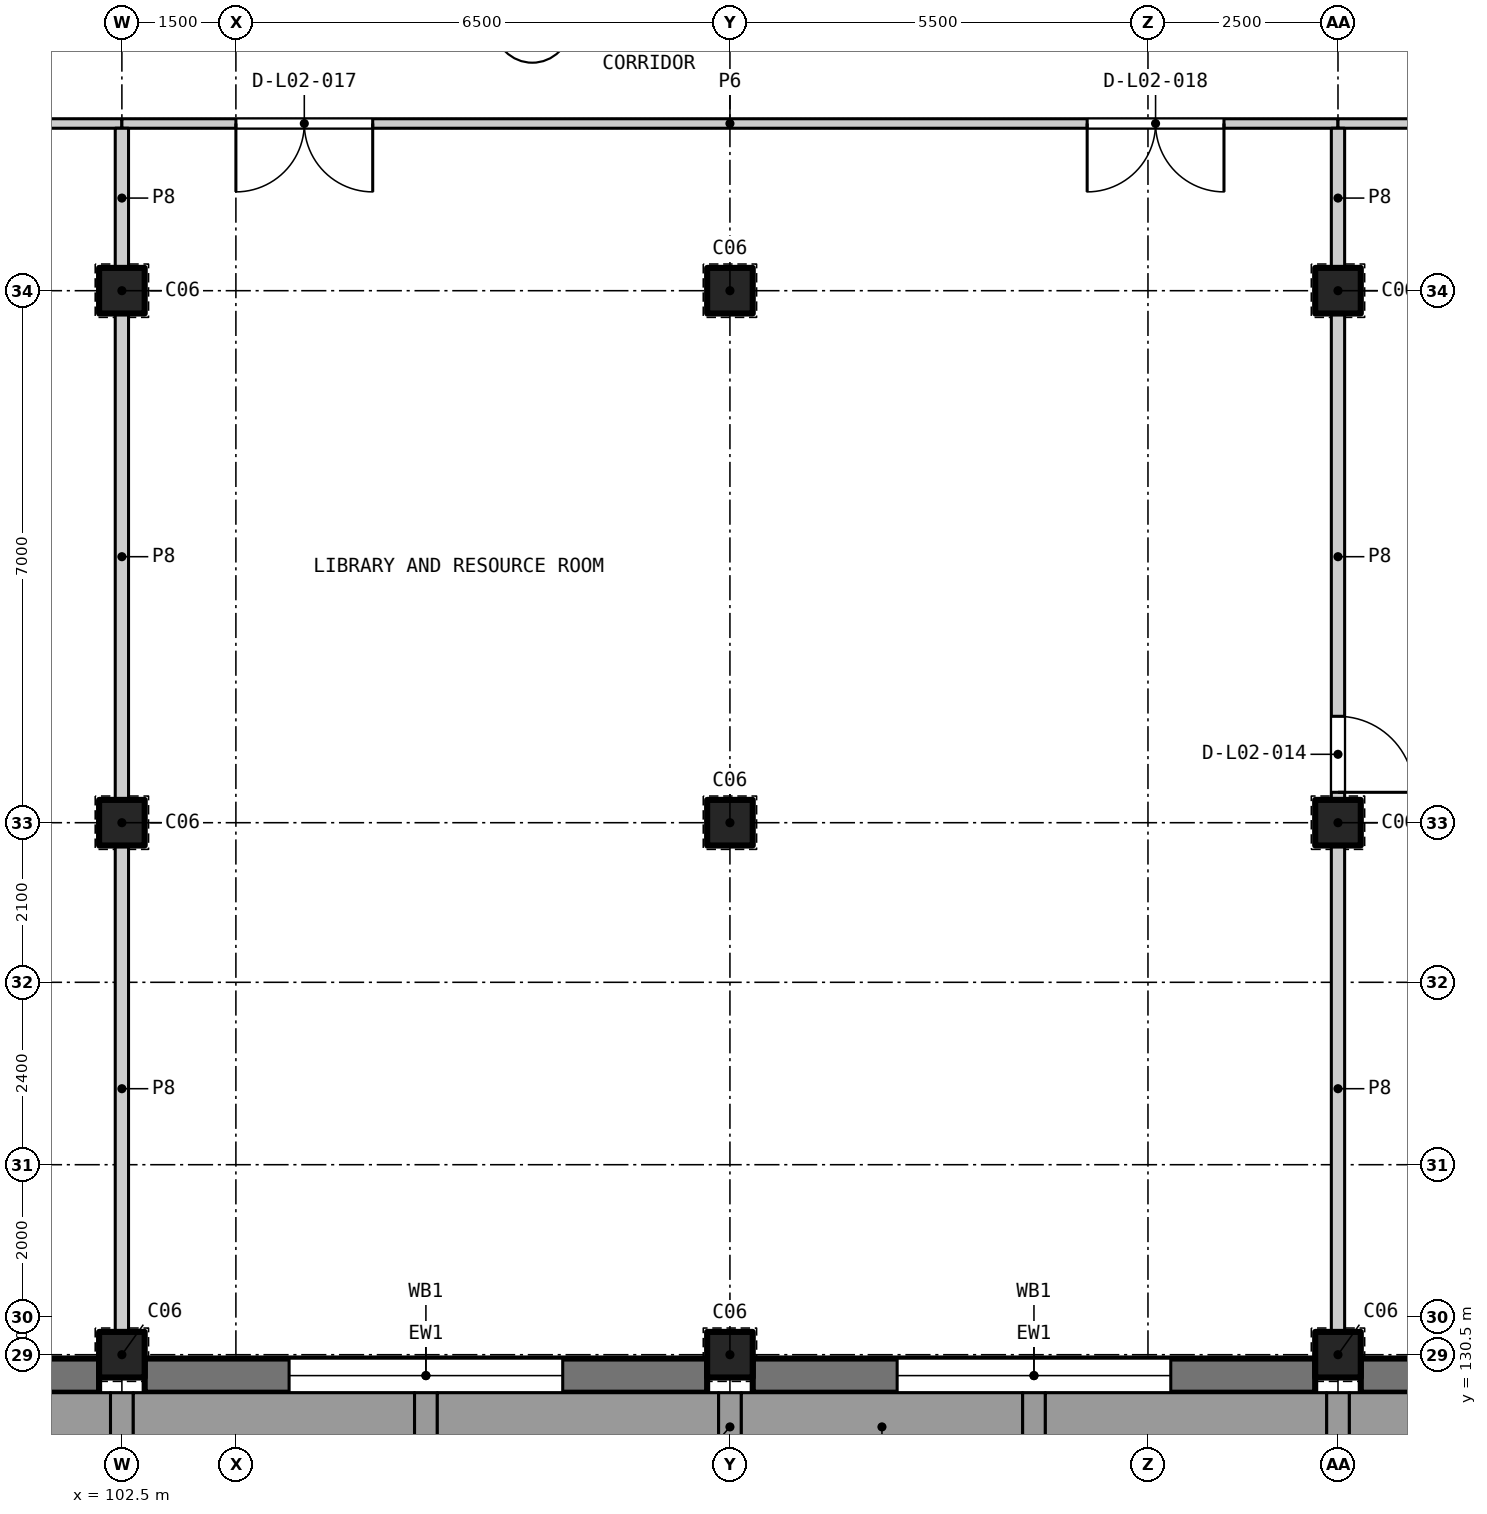
"""IFC4 building model, lengths in metres.
Left out: names, types, materials, properties, quantities, classifications, styles, units other than length and angle.
Written with IfcOpenShell. Run it as: python <this file> out.ifc"""

import sys

from ifc_helpers import new_model, si_unit, direction, frame, frame_2d, origin, origin_2d, place, context, subcontext, project, spatial, rectangle, extrude, element, fill, save


model = new_model("IFC4")
c1 = context("Model", 3, precision=1e-05, world=origin(), true_north=direction((0.0, 1.0)))
c2 = subcontext(c1, "Body", "Model", "MODEL_VIEW")
j1 = project(units=[si_unit("LENGTHUNIT", "METRE"), si_unit("PLANEANGLEUNIT", "RADIAN")], contexts=[c1])
p1 = place(None, origin())
s1 = spatial("IfcSite", under=j1, at=p1, CompositionType="ELEMENT")
p2 = place(p1, origin())
s2 = spatial("IfcBuilding", under=s1, at=p2, CompositionType="ELEMENT")
p3 = place(p2, frame((0.0, 0.0, 10.2)))
s3 = spatial("IfcBuildingStorey", under=s2, at=p3, CompositionType="ELEMENT", Elevation=10.2)
for number, where, z_axis, x_axis in (
    (1, (102.5, 130.5, 0.0), (0.0, 0.0, 1.0), (1.0, 0.0, 0.0)),
    (2, (102.5, 137.5, 0.0), (0.0, 0.0, 1.0), (1.0, 0.0, 0.0)),
    (3, (102.5, 144.5, 0.0), (0.0, 0.0, 1.0), (1.0, 0.0, 0.0)),
    (4, (110.5, 130.5, 0.0), (0.0, 0.0, 1.0), (1.0, 0.0, 0.0)),
    (5, (110.5, 137.5, 0.0), (0.0, 0.0, 1.0), (1.0, 0.0, 0.0)),
    (6, (110.5, 144.5, 0.0), (0.0, 0.0, 1.0), (1.0, 0.0, 0.0)),
    (7, (118.5, 130.5, 0.0), (0.0, 0.0, 1.0), (1.0, 0.0, 0.0)),
    (8, (118.5, 137.5, 0.0), (0.0, 0.0, 1.0), (1.0, 0.0, 0.0)),
    (9, (118.5, 144.5, 0.0), (0.0, 0.0, 1.0), (1.0, 0.0, 0.0)),
):
    element("IfcColumn", number, at=place(p3, frame(where, z_axis=z_axis, x_axis=x_axis)), inside=s3, PredefinedType="COLUMN", context=c2, shape_type="SweptSolid", body=[
        extrude(rectangle(XDim=0.6, YDim=0.6, at=origin_2d()), origin(), (0.0, 0.0, 1.0), 4.2),
    ])
p4 = place(p3, frame((102.2, 130.225, 0.0), z_axis=(0.0, 0.0, 1.0), x_axis=(-1.0, 0.0, 0.0)))
e10 = element("IfcWall", 10, at=p4, inside=s3, PredefinedType="SOLIDWALL", context=c2, shape_type="SweptSolid", body=[
    extrude(rectangle(XDim=7.4, YDim=0.45, at=frame_2d((3.7, 0.0))), origin(), (0.0, 0.0, 1.0), 3.1),
])
p5 = place(p4, frame((1.9, 0.0, 0.9)))
e11 = element("IfcOpeningElement", 11, at=p5, cuts=e10, PredefinedType="OPENING", context=c2, shape_type="SweptSolid", body=[
    extrude(rectangle(XDim=3.6, YDim=1.6, at=frame_2d((1.8, 0.8))), frame((0.0, 0.235, 0.0), z_axis=(0.0, -1.0, 0.0), x_axis=(1.0, 0.0, 0.0)), (0.0, 0.0, 1.0), 0.47),
])
p6 = place(p3, frame((110.2, 130.225, 0.0), z_axis=(0.0, 0.0, 1.0), x_axis=(-1.0, 0.0, 0.0)))
e12 = element("IfcWall", 12, at=p6, inside=s3, PredefinedType="SOLIDWALL", context=c2, shape_type="SweptSolid", body=[
    extrude(rectangle(XDim=7.4, YDim=0.45, at=frame_2d((3.7, 0.0))), origin(), (0.0, 0.0, 1.0), 3.1),
])
p7 = place(p6, frame((1.9, 0.0, 0.9)))
e13 = element("IfcOpeningElement", 13, at=p7, cuts=e12, PredefinedType="OPENING", context=c2, shape_type="SweptSolid", body=[
    extrude(rectangle(XDim=3.6, YDim=1.6, at=frame_2d((1.8, 0.8))), frame((0.0, 0.235, 0.0), z_axis=(0.0, -1.0, 0.0), x_axis=(1.0, 0.0, 0.0)), (0.0, 0.0, 1.0), 0.47),
])
p8 = place(p3, frame((118.2, 130.225, 0.0), z_axis=(0.0, 0.0, 1.0), x_axis=(-1.0, 0.0, 0.0)))
e14 = element("IfcWall", 14, at=p8, inside=s3, PredefinedType="SOLIDWALL", context=c2, shape_type="SweptSolid", body=[
    extrude(rectangle(XDim=7.4, YDim=0.45, at=frame_2d((3.7, 0.0))), origin(), (0.0, 0.0, 1.0), 3.1),
])
p9 = place(p8, frame((1.9, 0.0, 0.9)))
e15 = element("IfcOpeningElement", 15, at=p9, cuts=e14, PredefinedType="OPENING", context=c2, shape_type="SweptSolid", body=[
    extrude(rectangle(XDim=3.6, YDim=1.6, at=frame_2d((1.8, 0.8))), frame((0.0, 0.235, 0.0), z_axis=(0.0, -1.0, 0.0), x_axis=(1.0, 0.0, 0.0)), (0.0, 0.0, 1.0), 0.47),
])
p10 = place(p3, frame((126.2, 130.225, 0.0), z_axis=(0.0, 0.0, 1.0), x_axis=(-1.0, 0.0, 0.0)))
e16 = element("IfcWall", 16, at=p10, inside=s3, PredefinedType="SOLIDWALL", context=c2, shape_type="SweptSolid", body=[
    extrude(rectangle(XDim=7.4, YDim=0.45, at=frame_2d((3.7, 0.0))), origin(), (0.0, 0.0, 1.0), 3.1),
])
p11 = place(p10, frame((1.9, 0.0, 0.9)))
e17 = element("IfcOpeningElement", 17, at=p11, cuts=e16, PredefinedType="OPENING", context=c2, shape_type="SweptSolid", body=[
    extrude(rectangle(XDim=3.6, YDim=1.6, at=frame_2d((1.8, 0.8))), frame((0.0, 0.235, 0.0), z_axis=(0.0, -1.0, 0.0), x_axis=(1.0, 0.0, 0.0)), (0.0, 0.0, 1.0), 0.47),
])
p12 = place(p3, frame((94.5, 146.7, 0.0), z_axis=(0.0, 0.0, 1.0), x_axis=(1.0, 0.0, 0.0)))
e18 = element("IfcWall", 18, at=p12, inside=s3, PredefinedType="PARTITIONING", context=c2, shape_type="SweptSolid", body=[
    extrude(rectangle(XDim=8.0, YDim=0.125, at=frame_2d((4.0, 0.0))), origin(), (0.0, 0.0, 1.0), 3.9),
])
p13 = place(p12, frame((3.5, 0.0, 0.0)))
e19 = element("IfcOpeningElement", 19, at=p13, cuts=e18, PredefinedType="OPENING", context=c2, shape_type="SweptSolid", body=[
    extrude(rectangle(XDim=1.0, YDim=2.1, at=frame_2d((0.5, 1.05))), frame((0.0, 0.073, 0.0), z_axis=(0.0, -1.0, 0.0), x_axis=(1.0, 0.0, 0.0)), (0.0, 0.0, 1.0), 0.145),
])
p14 = place(p3, frame((102.5, 146.7, 0.0), z_axis=(0.0, 0.0, 1.0), x_axis=(1.0, 0.0, 0.0)))
e20 = element("IfcWall", 20, at=p14, inside=s3, PredefinedType="PARTITIONING", context=c2, shape_type="SweptSolid", body=[
    extrude(rectangle(XDim=16.0, YDim=0.125, at=frame_2d((8.0, 0.0))), origin(), (0.0, 0.0, 1.0), 3.9),
])
p15 = place(p14, frame((1.5, 0.0, 0.0)))
e21 = element("IfcOpeningElement", 21, at=p15, cuts=e20, PredefinedType="OPENING", context=c2, shape_type="SweptSolid", body=[
    extrude(rectangle(XDim=1.8, YDim=2.1, at=frame_2d((0.9, 1.05))), frame((0.0, 0.073, 0.0), z_axis=(0.0, -1.0, 0.0), x_axis=(1.0, 0.0, 0.0)), (0.0, 0.0, 1.0), 0.145),
])
p16 = place(p14, frame((12.7, 0.0, 0.0)))
e22 = element("IfcOpeningElement", 22, at=p16, cuts=e20, PredefinedType="OPENING", context=c2, shape_type="SweptSolid", body=[
    extrude(rectangle(XDim=1.8, YDim=2.1, at=frame_2d((0.9, 1.05))), frame((0.0, 0.073, 0.0), z_axis=(0.0, -1.0, 0.0), x_axis=(1.0, 0.0, 0.0)), (0.0, 0.0, 1.0), 0.145),
])
p17 = place(p3, frame((118.5, 146.7, 0.0), z_axis=(0.0, 0.0, 1.0), x_axis=(1.0, 0.0, 0.0)))
e23 = element("IfcWall", 23, at=p17, inside=s3, PredefinedType="PARTITIONING", context=c2, shape_type="SweptSolid", body=[
    extrude(rectangle(XDim=8.0, YDim=0.125, at=frame_2d((4.0, 0.0))), origin(), (0.0, 0.0, 1.0), 3.9),
])
p18 = place(p17, frame((3.5, 0.0, 0.0)))
e24 = element("IfcOpeningElement", 24, at=p18, cuts=e23, PredefinedType="OPENING", context=c2, shape_type="SweptSolid", body=[
    extrude(rectangle(XDim=1.0, YDim=2.1, at=frame_2d((0.5, 1.05))), frame((0.0, 0.073, 0.0), z_axis=(0.0, -1.0, 0.0), x_axis=(1.0, 0.0, 0.0)), (0.0, 0.0, 1.0), 0.145),
])
for number, where, z_axis, x_axis in (
    (25, (102.5, 130.8, 0.0), (0.0, 0.0, 1.0), (0.0, 1.0, 0.0)),
    (26, (102.5, 137.8, 0.0), (0.0, 0.0, 1.0), (0.0, 1.0, 0.0)),
):
    element("IfcWall", number, at=place(p3, frame(where, z_axis=z_axis, x_axis=x_axis)), inside=s3, PredefinedType="PARTITIONING", context=c2, shape_type="SweptSolid", body=[
        extrude(rectangle(XDim=6.4, YDim=0.175, at=frame_2d((3.2, 0.0))), origin(), (0.0, 0.0, 1.0), 3.2),
    ])
p19 = place(p3, frame((102.5, 144.8, 0.0), z_axis=(0.0, 0.0, 1.0), x_axis=(0.0, 1.0, 0.0)))
e27 = element("IfcWall", 27, at=p19, inside=s3, PredefinedType="PARTITIONING", context=c2, shape_type="SweptSolid", body=[
    extrude(rectangle(XDim=1.837, YDim=0.175, at=frame_2d((0.919, 0.0))), origin(), (0.0, 0.0, 1.0), 3.2),
])
p20 = place(p3, frame((118.5, 130.8, 0.0), z_axis=(0.0, 0.0, 1.0), x_axis=(0.0, 1.0, 0.0)))
e28 = element("IfcWall", 28, at=p20, inside=s3, PredefinedType="PARTITIONING", context=c2, shape_type="SweptSolid", body=[
    extrude(rectangle(XDim=6.4, YDim=0.175, at=frame_2d((3.2, 0.0))), origin(), (0.0, 0.0, 1.0), 3.2),
])
p21 = place(p3, frame((118.5, 137.8, 0.0), z_axis=(0.0, 0.0, 1.0), x_axis=(0.0, 1.0, 0.0)))
e29 = element("IfcWall", 29, at=p21, inside=s3, PredefinedType="PARTITIONING", context=c2, shape_type="SweptSolid", body=[
    extrude(rectangle(XDim=6.4, YDim=0.175, at=frame_2d((3.2, 0.0))), origin(), (0.0, 0.0, 1.0), 3.2),
])
p22 = place(p21, frame((0.1, 0.0, 0.0)))
e30 = element("IfcOpeningElement", 30, at=p22, cuts=e29, PredefinedType="OPENING", context=c2, shape_type="SweptSolid", body=[
    extrude(rectangle(XDim=1.0, YDim=2.1, at=frame_2d((0.5, 1.05))), frame((0.0, 0.097, 0.0), z_axis=(0.0, -1.0, 0.0), x_axis=(1.0, 0.0, 0.0)), (0.0, 0.0, 1.0), 0.195),
])
p23 = place(p3, frame((118.5, 144.8, 0.0), z_axis=(0.0, 0.0, 1.0), x_axis=(0.0, 1.0, 0.0)))
e31 = element("IfcWall", 31, at=p23, inside=s3, PredefinedType="PARTITIONING", context=c2, shape_type="SweptSolid", body=[
    extrude(rectangle(XDim=1.837, YDim=0.175, at=frame_2d((0.919, 0.0))), origin(), (0.0, 0.0, 1.0), 3.2),
])
p24 = place(p7, origin())
e32 = element("IfcWindow", 32, at=p24, inside=s3, PartitioningType="SINGLE_PANEL", PredefinedType="WINDOW", context=c2, shape_type="SweptSolid", body=[
    extrude(rectangle(XDim=3.6, YDim=1.6, at=frame_2d((1.8, 0.8))), frame((0.0, -0.125, 0.0), z_axis=(0.0, -1.0, 0.0), x_axis=(1.0, 0.0, 0.0)), (0.0, 0.0, 1.0), 0.06),
])
fill(e13, e32)
p25 = place(p9, origin())
e33 = element("IfcWindow", 33, at=p25, inside=s3, PartitioningType="SINGLE_PANEL", PredefinedType="WINDOW", context=c2, shape_type="SweptSolid", body=[
    extrude(rectangle(XDim=3.6, YDim=1.6, at=frame_2d((1.8, 0.8))), frame((0.0, -0.125, 0.0), z_axis=(0.0, -1.0, 0.0), x_axis=(1.0, 0.0, 0.0)), (0.0, 0.0, 1.0), 0.06),
])
fill(e15, e33)
p26 = place(p22, frame((1.0, 0.0, 0.0), z_axis=(0.0, 0.0, 1.0), x_axis=(-1.0, 0.0, 0.0)))
e34 = element("IfcDoor", 34, at=p26, inside=s3, OperationType="SINGLE_SWING_RIGHT", PredefinedType="DOOR", context=c2, shape_type="SweptSolid", body=[
    extrude(rectangle(XDim=1.0, YDim=2.1, at=frame_2d((0.5, 1.05))), frame((0.0, 0.025, 0.0), z_axis=(0.0, -1.0, 0.0), x_axis=(1.0, 0.0, 0.0)), (0.0, 0.0, 1.0), 0.05),
])
fill(e30, e34)
p27 = place(p15, frame((1.8, 0.0, 0.0), z_axis=(0.0, 0.0, 1.0), x_axis=(-1.0, 0.0, 0.0)))
e35 = element("IfcDoor", 35, at=p27, inside=s3, OperationType="DOUBLE_DOOR_SINGLE_SWING", PredefinedType="DOOR", context=c2, shape_type="SweptSolid", body=[
    extrude(rectangle(XDim=1.8, YDim=2.1, at=frame_2d((0.9, 1.05))), frame((0.0, 0.025, 0.0), z_axis=(0.0, -1.0, 0.0), x_axis=(1.0, 0.0, 0.0)), (0.0, 0.0, 1.0), 0.05),
])
fill(e21, e35)
p28 = place(p16, frame((1.8, 0.0, 0.0), z_axis=(0.0, 0.0, 1.0), x_axis=(-1.0, 0.0, 0.0)))
e36 = element("IfcDoor", 36, at=p28, inside=s3, OperationType="DOUBLE_DOOR_SINGLE_SWING", PredefinedType="DOOR", context=c2, shape_type="SweptSolid", body=[
    extrude(rectangle(XDim=1.8, YDim=2.1, at=frame_2d((0.9, 1.05))), frame((0.0, 0.025, 0.0), z_axis=(0.0, -1.0, 0.0), x_axis=(1.0, 0.0, 0.0)), (0.0, 0.0, 1.0), 0.05),
])
fill(e22, e36)
save(model, sys.argv[1])
